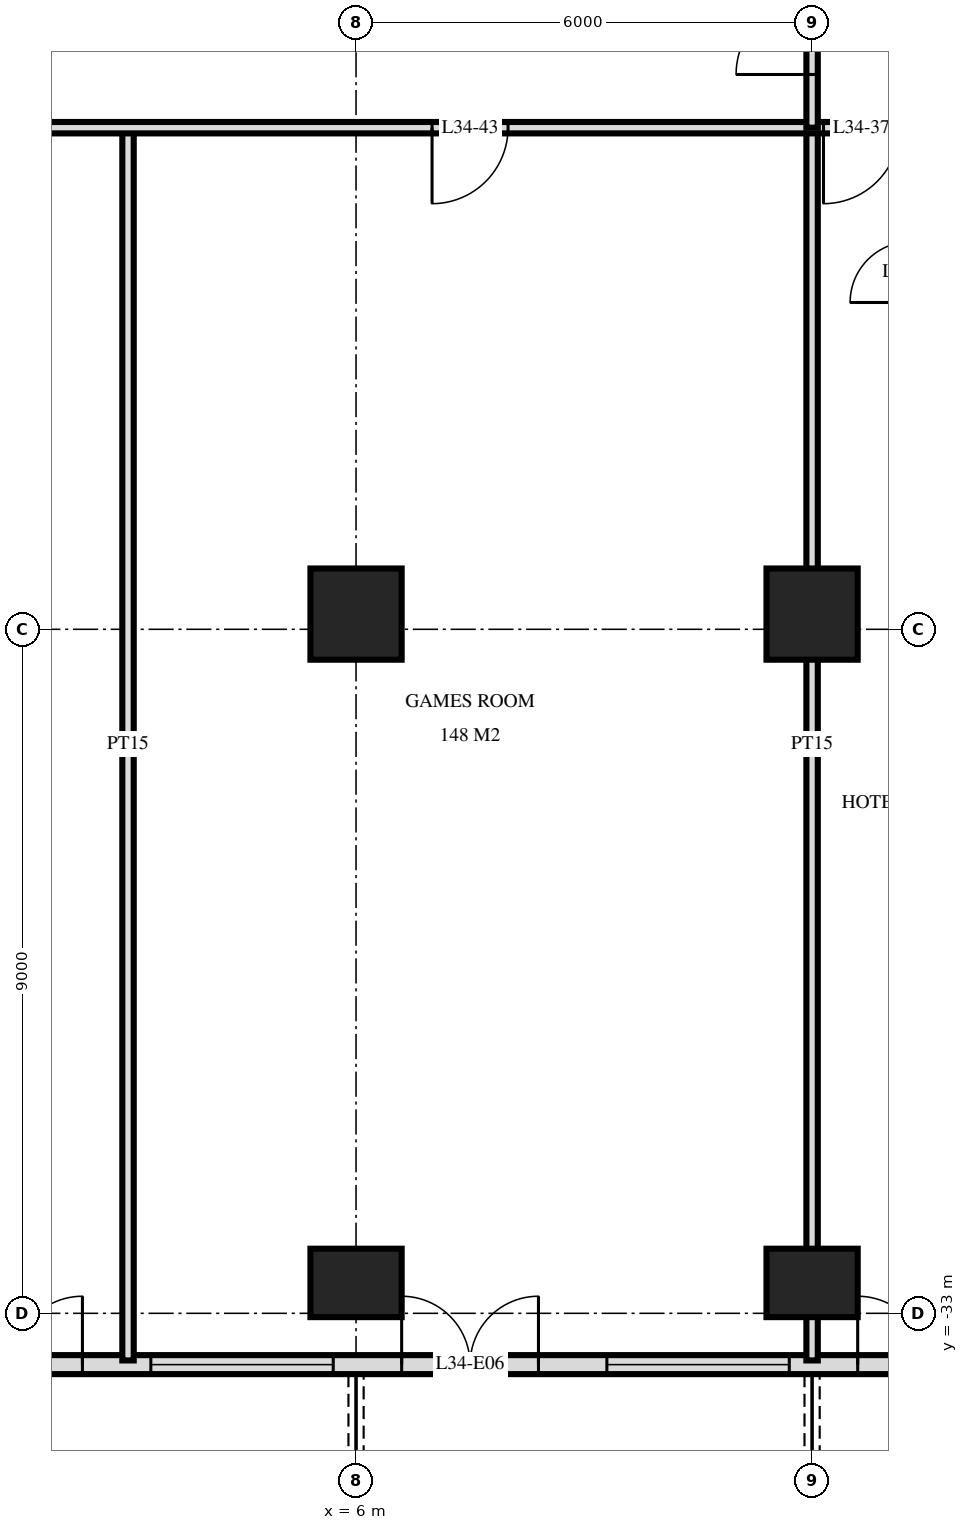
"""IFC4 building model, lengths in metres.
Left out: names, types, materials, properties, quantities, classifications, styles, units other than length and angle.
Written with IfcOpenShell. Run it as: python <this file> out.ifc"""

import sys

from ifc_helpers import new_model, si_unit, direction, frame, frame_2d, origin, origin_2d, place, context, subcontext, project, spatial, rectangle, extrude, element, fill, save


model = new_model("IFC4")
c1 = context("Model", 3, precision=1e-05, world=origin(), true_north=direction((0.0, 1.0)))
c2 = subcontext(c1, "Body", "Model", "MODEL_VIEW")
j1 = project(units=[si_unit("LENGTHUNIT", "METRE"), si_unit("PLANEANGLEUNIT", "RADIAN")], contexts=[c1])
p1 = place(None, origin())
s1 = spatial("IfcSite", under=j1, at=p1, CompositionType="ELEMENT")
p2 = place(p1, origin())
s2 = spatial("IfcBuilding", under=s1, at=p2, CompositionType="ELEMENT")
p3 = place(p2, frame((0.0, 0.0, 134.4)))
s3 = spatial("IfcBuildingStorey", under=s2, at=p3, CompositionType="ELEMENT", Elevation=134.4)
p4 = place(p3, frame((6.0, -32.6, 0.0), z_axis=(0.0, 0.0, 1.0), x_axis=(1.0, 0.0, 0.0)))
e1 = element("IfcColumn", 1, at=p4, inside=s3, PredefinedType="COLUMN", context=c2, shape_type="SweptSolid", body=[
    extrude(rectangle(XDim=1.2, YDim=0.9, at=origin_2d()), origin(), (0.0, 0.0, 1.0), 3.6),
])
p5 = place(p3, frame((6.0, -23.8, 0.0), z_axis=(0.0, 0.0, 1.0), x_axis=(1.0, 0.0, 0.0)))
e2 = element("IfcColumn", 2, at=p5, inside=s3, PredefinedType="COLUMN", context=c2, shape_type="SweptSolid", body=[
    extrude(rectangle(XDim=1.2, YDim=1.2, at=origin_2d()), origin(), (0.0, 0.0, 1.0), 3.6),
])
p6 = place(p3, frame((12.0, -32.6, 0.0), z_axis=(0.0, 0.0, 1.0), x_axis=(1.0, 0.0, 0.0)))
e3 = element("IfcColumn", 3, at=p6, inside=s3, PredefinedType="COLUMN", context=c2, shape_type="SweptSolid", body=[
    extrude(rectangle(XDim=1.2, YDim=0.9, at=origin_2d()), origin(), (0.0, 0.0, 1.0), 3.6),
])
p7 = place(p3, frame((12.0, -23.8, 0.0), z_axis=(0.0, 0.0, 1.0), x_axis=(1.0, 0.0, 0.0)))
e4 = element("IfcColumn", 4, at=p7, inside=s3, PredefinedType="COLUMN", context=c2, shape_type="SweptSolid", body=[
    extrude(rectangle(XDim=1.2, YDim=1.2, at=origin_2d()), origin(), (0.0, 0.0, 1.0), 3.6),
])
p8 = place(p3, frame((-23.675, -33.675, 0.0), z_axis=(0.0, 0.0, 1.0), x_axis=(1.0, 0.0, 0.0)))
e5 = element("IfcWall", 5, at=p8, inside=s3, PredefinedType="SOLIDWALL", context=c2, shape_type="SweptSolid", body=[
    extrude(rectangle(XDim=47.351, YDim=0.25, at=frame_2d((23.675, 0.0))), origin(), (0.0, 0.0, 1.0), 3.32),
])
p9 = place(p8, frame((0.575, 0.0, 0.0)))
e6 = element("IfcOpeningElement", 6, at=p9, cuts=e5, PredefinedType="OPENING", context=c2, shape_type="SweptSolid", body=[
    extrude(rectangle(XDim=1.8, YDim=2.4, at=frame_2d((0.9, 1.2))), frame((0.0, 0.135, 0.0), z_axis=(0.0, -1.0, 0.0), x_axis=(1.0, 0.0, 0.0)), (0.0, 0.0, 1.0), 0.27),
])
p10 = place(p8, frame((3.425, 0.0, 0.3)))
e7 = element("IfcOpeningElement", 7, at=p10, cuts=e5, PredefinedType="OPENING", context=c2, shape_type="SweptSolid", body=[
    extrude(rectangle(XDim=1.8, YDim=2.1, at=frame_2d((0.9, 1.05))), frame((0.0, 0.135, 0.0), z_axis=(0.0, -1.0, 0.0), x_axis=(1.0, 0.0, 0.0)), (0.0, 0.0, 1.0), 0.27),
])
p11 = place(p8, frame((5.975, 0.0, 0.3)))
e8 = element("IfcOpeningElement", 8, at=p11, cuts=e5, PredefinedType="OPENING", context=c2, shape_type="SweptSolid", body=[
    extrude(rectangle(XDim=2.4, YDim=2.1, at=frame_2d((1.2, 1.05))), frame((0.0, 0.135, 0.0), z_axis=(0.0, -1.0, 0.0), x_axis=(1.0, 0.0, 0.0)), (0.0, 0.0, 1.0), 0.27),
])
p12 = place(p8, frame((9.275, 0.0, 0.0)))
e9 = element("IfcOpeningElement", 9, at=p12, cuts=e5, PredefinedType="OPENING", context=c2, shape_type="SweptSolid", body=[
    extrude(rectangle(XDim=1.8, YDim=2.4, at=frame_2d((0.9, 1.2))), frame((0.0, 0.135, 0.0), z_axis=(0.0, -1.0, 0.0), x_axis=(1.0, 0.0, 0.0)), (0.0, 0.0, 1.0), 0.27),
])
p13 = place(p8, frame((12.275, 0.0, 0.0)))
e10 = element("IfcOpeningElement", 10, at=p13, cuts=e5, PredefinedType="OPENING", context=c2, shape_type="SweptSolid", body=[
    extrude(rectangle(XDim=1.8, YDim=2.4, at=frame_2d((0.9, 1.2))), frame((0.0, 0.135, 0.0), z_axis=(0.0, -1.0, 0.0), x_axis=(1.0, 0.0, 0.0)), (0.0, 0.0, 1.0), 0.27),
])
p14 = place(p8, frame((14.975, 0.0, 0.3)))
e11 = element("IfcOpeningElement", 11, at=p14, cuts=e5, PredefinedType="OPENING", context=c2, shape_type="SweptSolid", body=[
    extrude(rectangle(XDim=2.4, YDim=2.1, at=frame_2d((1.2, 1.05))), frame((0.0, 0.135, 0.0), z_axis=(0.0, -1.0, 0.0), x_axis=(1.0, 0.0, 0.0)), (0.0, 0.0, 1.0), 0.27),
])
p15 = place(p8, frame((17.975, 0.0, 0.3)))
e12 = element("IfcOpeningElement", 12, at=p15, cuts=e5, PredefinedType="OPENING", context=c2, shape_type="SweptSolid", body=[
    extrude(rectangle(XDim=2.4, YDim=2.1, at=frame_2d((1.2, 1.05))), frame((0.0, 0.135, 0.0), z_axis=(0.0, -1.0, 0.0), x_axis=(1.0, 0.0, 0.0)), (0.0, 0.0, 1.0), 0.27),
])
p16 = place(p8, frame((21.275, 0.0, 0.0)))
e13 = element("IfcOpeningElement", 13, at=p16, cuts=e5, PredefinedType="OPENING", context=c2, shape_type="SweptSolid", body=[
    extrude(rectangle(XDim=1.8, YDim=2.4, at=frame_2d((0.9, 1.2))), frame((0.0, 0.135, 0.0), z_axis=(0.0, -1.0, 0.0), x_axis=(1.0, 0.0, 0.0)), (0.0, 0.0, 1.0), 0.27),
])
p17 = place(p8, frame((24.275, 0.0, 0.0)))
e14 = element("IfcOpeningElement", 14, at=p17, cuts=e5, PredefinedType="OPENING", context=c2, shape_type="SweptSolid", body=[
    extrude(rectangle(XDim=1.8, YDim=2.4, at=frame_2d((0.9, 1.2))), frame((0.0, 0.135, 0.0), z_axis=(0.0, -1.0, 0.0), x_axis=(1.0, 0.0, 0.0)), (0.0, 0.0, 1.0), 0.27),
])
p18 = place(p8, frame((26.975, 0.0, 0.3)))
e15 = element("IfcOpeningElement", 15, at=p18, cuts=e5, PredefinedType="OPENING", context=c2, shape_type="SweptSolid", body=[
    extrude(rectangle(XDim=2.4, YDim=2.1, at=frame_2d((1.2, 1.05))), frame((0.0, 0.135, 0.0), z_axis=(0.0, -1.0, 0.0), x_axis=(1.0, 0.0, 0.0)), (0.0, 0.0, 1.0), 0.27),
])
p19 = place(p8, frame((30.275, 0.0, 0.0)))
e16 = element("IfcOpeningElement", 16, at=p19, cuts=e5, PredefinedType="OPENING", context=c2, shape_type="SweptSolid", body=[
    extrude(rectangle(XDim=1.8, YDim=2.4, at=frame_2d((0.9, 1.2))), frame((0.0, 0.135, 0.0), z_axis=(0.0, -1.0, 0.0), x_axis=(1.0, 0.0, 0.0)), (0.0, 0.0, 1.0), 0.27),
])
p20 = place(p8, frame((32.975, 0.0, 0.3)))
e17 = element("IfcOpeningElement", 17, at=p20, cuts=e5, PredefinedType="OPENING", context=c2, shape_type="SweptSolid", body=[
    extrude(rectangle(XDim=2.4, YDim=2.1, at=frame_2d((1.2, 1.05))), frame((0.0, 0.135, 0.0), z_axis=(0.0, -1.0, 0.0), x_axis=(1.0, 0.0, 0.0)), (0.0, 0.0, 1.0), 0.27),
])
p21 = place(p8, frame((36.275, 0.0, 0.0)))
e18 = element("IfcOpeningElement", 18, at=p21, cuts=e5, PredefinedType="OPENING", context=c2, shape_type="SweptSolid", body=[
    extrude(rectangle(XDim=1.8, YDim=2.4, at=frame_2d((0.9, 1.2))), frame((0.0, 0.135, 0.0), z_axis=(0.0, -1.0, 0.0), x_axis=(1.0, 0.0, 0.0)), (0.0, 0.0, 1.0), 0.27),
])
p22 = place(p8, frame((38.975, 0.0, 0.3)))
e19 = element("IfcOpeningElement", 19, at=p22, cuts=e5, PredefinedType="OPENING", context=c2, shape_type="SweptSolid", body=[
    extrude(rectangle(XDim=2.4, YDim=2.1, at=frame_2d((1.2, 1.05))), frame((0.0, 0.135, 0.0), z_axis=(0.0, -1.0, 0.0), x_axis=(1.0, 0.0, 0.0)), (0.0, 0.0, 1.0), 0.27),
])
p23 = place(p8, frame((42.275, 0.0, 0.0)))
e20 = element("IfcOpeningElement", 20, at=p23, cuts=e5, PredefinedType="OPENING", context=c2, shape_type="SweptSolid", body=[
    extrude(rectangle(XDim=1.8, YDim=2.4, at=frame_2d((0.9, 1.2))), frame((0.0, 0.135, 0.0), z_axis=(0.0, -1.0, 0.0), x_axis=(1.0, 0.0, 0.0)), (0.0, 0.0, 1.0), 0.27),
])
p24 = place(p8, frame((45.125, 0.0, 0.3)))
e21 = element("IfcOpeningElement", 21, at=p24, cuts=e5, PredefinedType="OPENING", context=c2, shape_type="SweptSolid", body=[
    extrude(rectangle(XDim=1.8, YDim=2.1, at=frame_2d((0.9, 1.05))), frame((0.0, 0.135, 0.0), z_axis=(0.0, -1.0, 0.0), x_axis=(1.0, 0.0, 0.0)), (0.0, 0.0, 1.0), 0.27),
])
p25 = place(p3, frame((12.0, -17.4, 0.0), z_axis=(0.0, 0.0, 1.0), x_axis=(0.0, 1.0, 0.0)))
e22 = element("IfcWall", 22, at=p25, inside=s3, PredefinedType="PARTITIONING", context=c2, shape_type="SweptSolid", body=[
    extrude(rectangle(XDim=2.35, YDim=0.15, at=frame_2d((1.175, 0.0))), origin(), (0.0, 0.0, 1.0), 3.32),
])
p26 = place(p25, frame((0.7, 0.0, 0.0)))
e23 = element("IfcOpeningElement", 23, at=p26, cuts=e22, PredefinedType="OPENING", context=c2, shape_type="SweptSolid", body=[
    extrude(rectangle(XDim=1.0, YDim=2.1, at=frame_2d((0.5, 1.05))), frame((0.0, 0.085, 0.0), z_axis=(0.0, -1.0, 0.0), x_axis=(1.0, 0.0, 0.0)), (0.0, 0.0, 1.0), 0.17),
])
for number, where, z_axis, x_axis in (
    (24, (12.0, -33.62, 0.0), (0.0, 0.0, 1.0), (0.0, 1.0, 0.0)),
    (25, (3.0, -33.62, 0.0), (0.0, 0.0, 1.0), (0.0, 1.0, 0.0)),
):
    element("IfcWall", number, at=place(p3, frame(where, z_axis=z_axis, x_axis=x_axis)), inside=s3, PredefinedType="PARTITIONING", context=c2, shape_type="SweptSolid", body=[
        extrude(rectangle(XDim=16.22, YDim=0.15, at=frame_2d((8.11, 0.0))), origin(), (0.0, 0.0, 1.0), 3.32),
    ])
p27 = place(p3, frame((-28.02, -17.4, 0.0), z_axis=(0.0, 0.0, 1.0), x_axis=(1.0, 0.0, 0.0)))
e26 = element("IfcWall", 26, at=p27, inside=s3, PredefinedType="PARTITIONING", context=c2, shape_type="SweptSolid", body=[
    extrude(rectangle(XDim=56.04, YDim=0.15, at=frame_2d((28.02, 0.0))), origin(), (0.0, 0.0, 1.0), 3.32),
])
p28 = place(p27, frame((13.17, 0.0, 0.0)))
e27 = element("IfcOpeningElement", 27, at=p28, cuts=e26, PredefinedType="OPENING", context=c2, shape_type="SweptSolid", body=[
    extrude(rectangle(XDim=1.0, YDim=2.1, at=frame_2d((0.5, 1.05))), frame((0.0, 0.085, 0.0), z_axis=(0.0, -1.0, 0.0), x_axis=(1.0, 0.0, 0.0)), (0.0, 0.0, 1.0), 0.17),
])
p29 = place(p27, frame((11.87, 0.0, 0.0)))
e28 = element("IfcOpeningElement", 28, at=p29, cuts=e26, PredefinedType="OPENING", context=c2, shape_type="SweptSolid", body=[
    extrude(rectangle(XDim=1.0, YDim=2.1, at=frame_2d((0.5, 1.05))), frame((0.0, 0.085, 0.0), z_axis=(0.0, -1.0, 0.0), x_axis=(1.0, 0.0, 0.0)), (0.0, 0.0, 1.0), 0.17),
])
p30 = place(p27, frame((2.32, 0.0, 0.0)))
e29 = element("IfcOpeningElement", 29, at=p30, cuts=e26, PredefinedType="OPENING", context=c2, shape_type="SweptSolid", body=[
    extrude(rectangle(XDim=1.0, YDim=2.1, at=frame_2d((0.5, 1.05))), frame((0.0, 0.085, 0.0), z_axis=(0.0, -1.0, 0.0), x_axis=(1.0, 0.0, 0.0)), (0.0, 0.0, 1.0), 0.17),
])
p31 = place(p27, frame((40.17, 0.0, 0.0)))
e30 = element("IfcOpeningElement", 30, at=p31, cuts=e26, PredefinedType="OPENING", context=c2, shape_type="SweptSolid", body=[
    extrude(rectangle(XDim=1.0, YDim=2.1, at=frame_2d((0.5, 1.05))), frame((0.0, 0.085, 0.0), z_axis=(0.0, -1.0, 0.0), x_axis=(1.0, 0.0, 0.0)), (0.0, 0.0, 1.0), 0.17),
])
p32 = place(p27, frame((51.22, 0.0, 0.0)))
e31 = element("IfcOpeningElement", 31, at=p32, cuts=e26, PredefinedType="OPENING", context=c2, shape_type="SweptSolid", body=[
    extrude(rectangle(XDim=1.0, YDim=2.1, at=frame_2d((0.5, 1.05))), frame((0.0, 0.085, 0.0), z_axis=(0.0, -1.0, 0.0), x_axis=(1.0, 0.0, 0.0)), (0.0, 0.0, 1.0), 0.17),
])
p33 = place(p27, frame((18.52, 0.0, 0.0)))
e32 = element("IfcOpeningElement", 32, at=p33, cuts=e26, PredefinedType="OPENING", context=c2, shape_type="SweptSolid", body=[
    extrude(rectangle(XDim=1.0, YDim=2.1, at=frame_2d((0.5, 1.05))), frame((0.0, 0.085, 0.0), z_axis=(0.0, -1.0, 0.0), x_axis=(1.0, 0.0, 0.0)), (0.0, 0.0, 1.0), 0.17),
])
p34 = place(p27, frame((26.02, 0.0, 0.0)))
e33 = element("IfcOpeningElement", 33, at=p34, cuts=e26, PredefinedType="OPENING", context=c2, shape_type="SweptSolid", body=[
    extrude(rectangle(XDim=1.0, YDim=2.1, at=frame_2d((0.5, 1.05))), frame((0.0, 0.085, 0.0), z_axis=(0.0, -1.0, 0.0), x_axis=(1.0, 0.0, 0.0)), (0.0, 0.0, 1.0), 0.17),
])
p35 = place(p27, frame((35.02, 0.0, 0.0)))
e34 = element("IfcOpeningElement", 34, at=p35, cuts=e26, PredefinedType="OPENING", context=c2, shape_type="SweptSolid", body=[
    extrude(rectangle(XDim=1.0, YDim=2.1, at=frame_2d((0.5, 1.05))), frame((0.0, 0.085, 0.0), z_axis=(0.0, -1.0, 0.0), x_axis=(1.0, 0.0, 0.0)), (0.0, 0.0, 1.0), 0.17),
])
p36 = place(p17, origin())
e35 = element("IfcDoor", 35, at=p36, inside=s3, OperationType="DOUBLE_DOOR_SINGLE_SWING", PredefinedType="DOOR", context=c2, shape_type="SweptSolid", body=[
    extrude(rectangle(XDim=1.8, YDim=2.4, at=frame_2d((0.9, 1.2))), frame((0.0, 0.025, 0.0), z_axis=(0.0, -1.0, 0.0), x_axis=(1.0, 0.0, 0.0)), (0.0, 0.0, 1.0), 0.05),
])
fill(e14, e35)
p37 = place(p18, origin())
e36 = element("IfcWindow", 36, at=p37, inside=s3, PartitioningType="SINGLE_PANEL", PredefinedType="WINDOW", context=c2, shape_type="SweptSolid", body=[
    extrude(rectangle(XDim=2.4, YDim=2.1, at=frame_2d((1.2, 1.05))), frame((0.0, 0.03, 0.0), z_axis=(0.0, -1.0, 0.0), x_axis=(1.0, 0.0, 0.0)), (0.0, 0.0, 1.0), 0.06),
])
fill(e15, e36)
p38 = place(p19, origin())
e37 = element("IfcDoor", 37, at=p38, inside=s3, OperationType="DOUBLE_DOOR_SINGLE_SWING", PredefinedType="DOOR", context=c2, shape_type="SweptSolid", body=[
    extrude(rectangle(XDim=1.8, YDim=2.4, at=frame_2d((0.9, 1.2))), frame((0.0, 0.025, 0.0), z_axis=(0.0, -1.0, 0.0), x_axis=(1.0, 0.0, 0.0)), (0.0, 0.0, 1.0), 0.05),
])
fill(e16, e37)
p39 = place(p20, origin())
e38 = element("IfcWindow", 38, at=p39, inside=s3, PartitioningType="SINGLE_PANEL", PredefinedType="WINDOW", context=c2, shape_type="SweptSolid", body=[
    extrude(rectangle(XDim=2.4, YDim=2.1, at=frame_2d((1.2, 1.05))), frame((0.0, 0.03, 0.0), z_axis=(0.0, -1.0, 0.0), x_axis=(1.0, 0.0, 0.0)), (0.0, 0.0, 1.0), 0.06),
])
fill(e17, e38)
p40 = place(p21, origin())
e39 = element("IfcDoor", 39, at=p40, inside=s3, OperationType="DOUBLE_DOOR_SINGLE_SWING", PredefinedType="DOOR", context=c2, shape_type="SweptSolid", body=[
    extrude(rectangle(XDim=1.8, YDim=2.4, at=frame_2d((0.9, 1.2))), frame((0.0, 0.025, 0.0), z_axis=(0.0, -1.0, 0.0), x_axis=(1.0, 0.0, 0.0)), (0.0, 0.0, 1.0), 0.05),
])
fill(e18, e39)
p41 = place(p26, origin())
e40 = element("IfcDoor", 40, at=p41, inside=s3, OperationType="SINGLE_SWING_RIGHT", PredefinedType="DOOR", context=c2, shape_type="SweptSolid", body=[
    extrude(rectangle(XDim=1.0, YDim=2.1, at=frame_2d((0.5, 1.05))), frame((0.0, 0.025, 0.0), z_axis=(0.0, -1.0, 0.0), x_axis=(1.0, 0.0, 0.0)), (0.0, 0.0, 1.0), 0.05),
])
fill(e23, e40)
p42 = place(p31, frame((0.5, 0.0, 0.0), z_axis=(0.0, 0.0, 1.0), x_axis=(-1.0, 0.0, 0.0)))
e41 = element("IfcDoor", 41, at=p42, inside=s3, OperationType="SINGLE_SWING_LEFT", PredefinedType="DOOR", context=c2, shape_type="SweptSolid", body=[
    extrude(rectangle(XDim=1.0, YDim=2.1, at=frame_2d((0.0, 1.05))), frame((0.0, -0.025, 0.0), z_axis=(0.0, 1.0, 0.0), x_axis=(-1.0, 0.0, 0.0)), (0.0, 0.0, 1.0), 0.05),
])
fill(e30, e41)
p43 = place(p35, frame((0.5, 0.0, 0.0), z_axis=(0.0, 0.0, 1.0), x_axis=(-1.0, 0.0, 0.0)))
e42 = element("IfcDoor", 42, at=p43, inside=s3, OperationType="SINGLE_SWING_LEFT", PredefinedType="DOOR", context=c2, shape_type="SweptSolid", body=[
    extrude(rectangle(XDim=1.0, YDim=2.1, at=frame_2d((0.0, 1.05))), frame((0.0, -0.025, 0.0), z_axis=(0.0, 1.0, 0.0), x_axis=(-1.0, 0.0, 0.0)), (0.0, 0.0, 1.0), 0.05),
])
fill(e34, e42)
save(model, sys.argv[1])
